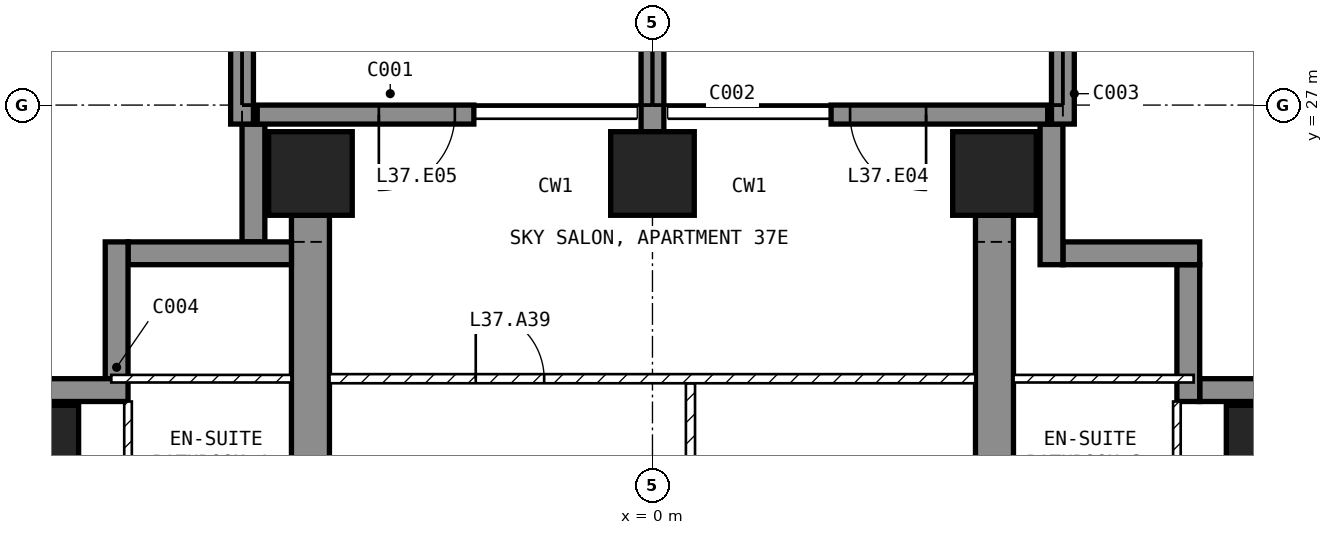
"""IFC4 building model, lengths in metres.
Left out: names, types, materials, properties, quantities, classifications, styles, units other than length and angle.
Written with IfcOpenShell. Run it as: python <this file> out.ifc"""

import sys

from ifc_helpers import new_model, si_unit, direction, frame, frame_2d, origin, origin_2d, place, context, subcontext, project, spatial, polyline, rectangle, outline, extrude, element, fill, save


model = new_model("IFC4")
c1 = context("Model", 3, precision=1e-05, world=origin(), true_north=direction((0.0, 1.0)))
c2 = subcontext(c1, "Body", "Model", "MODEL_VIEW")
j1 = project(units=[si_unit("LENGTHUNIT", "METRE"), si_unit("PLANEANGLEUNIT", "RADIAN")], contexts=[c1])
p1 = place(None, origin())
s1 = spatial("IfcSite", under=j1, at=p1, CompositionType="ELEMENT")
p2 = place(p1, origin())
s2 = spatial("IfcBuilding", under=s1, at=p2, CompositionType="ELEMENT")
p3 = place(p2, frame((0.0, 0.0, 151.4)))
s3 = spatial("IfcBuildingStorey", under=s2, at=p3, CompositionType="ELEMENT", Elevation=151.4)
for number, where, z_axis, x_axis in (
    (1, (-8.1, 22.5, -0.25), (0.0, 0.0, 1.0), (1.0, 0.0, 0.0)),
    (2, (-4.5, 26.1, -0.25), (0.0, 0.0, 1.0), (1.0, 0.0, 0.0)),
    (3, (0.0, 26.1, -0.25), (0.0, 0.0, 1.0), (1.0, 0.0, 0.0)),
    (4, (4.5, 26.1, -0.25), (0.0, 0.0, 1.0), (1.0, 0.0, 0.0)),
    (5, (8.1, 22.5, -0.25), (0.0, 0.0, 1.0), (1.0, 0.0, 0.0)),
):
    element("IfcColumn", number, at=place(p3, frame(where, z_axis=z_axis, x_axis=x_axis)), inside=s3, PredefinedType="COLUMN", context=c2, shape_type="SweptSolid", body=[
        extrude(rectangle(XDim=1.1, YDim=1.1, at=origin_2d()), origin(), (0.0, 0.0, 1.0), 3.45),
    ])
for number, where, z_axis, x_axis in (
    (6, (-4.75, 9.0, -0.25), (1.0, 0.0, 0.0), (0.0, 1.0, 0.0)),
    (7, (4.25, 9.0, -0.25), (1.0, 0.0, 0.0), (0.0, 1.0, 0.0)),
):
    element("IfcWall", number, at=place(p3, frame(where, z_axis=z_axis, x_axis=x_axis)), inside=s3, PredefinedType="SHEAR", context=c2, shape_type="SweptSolid", body=[
        extrude(outline(polyline([(0.0, 0.0), (2.1, 0.0), (2.1, 2.65), (4.5, 2.65), (4.5, 0.0), (9.9, 0.0), (9.9, 2.65), (12.3, 2.65), (12.3, 0.0), (16.55, 0.0), (16.55, 3.45), (0.0, 3.45), (0.0, 0.0)])), origin(), (0.0, 0.0, 1.0), 0.5),
    ])
p4 = place(p3, frame((5.2, 26.875, 0.0), z_axis=(0.0, 0.0, 1.0), x_axis=(-1.0, 0.0, 0.0)))
e8 = element("IfcWall", 8, at=p4, inside=s3, PredefinedType="SOLIDWALL", context=c2, shape_type="SweptSolid", body=[
    extrude(rectangle(XDim=2.85, YDim=0.25, at=frame_2d((1.425, 0.0))), origin(), (0.0, 0.0, 1.0), 3.2),
])
p5 = place(p4, frame((1.6, 0.0, 0.0)))
e9 = element("IfcOpeningElement", 9, at=p5, cuts=e8, PredefinedType="OPENING", context=c2, shape_type="SweptSolid", body=[
    extrude(rectangle(XDim=1.0, YDim=2.4, at=frame_2d((0.5, 1.2))), frame((0.0, 0.135, 0.0), z_axis=(0.0, -1.0, 0.0), x_axis=(1.0, 0.0, 0.0)), (0.0, 0.0, 1.0), 0.27),
])
p6 = place(p3, frame((-2.35, 26.875, 0.0), z_axis=(0.0, 0.0, 1.0), x_axis=(-1.0, 0.0, 0.0)))
e10 = element("IfcWall", 10, at=p6, inside=s3, PredefinedType="SOLIDWALL", context=c2, shape_type="SweptSolid", body=[
    extrude(rectangle(XDim=2.85, YDim=0.25, at=frame_2d((1.425, 0.0))), origin(), (0.0, 0.0, 1.0), 3.2),
])
p7 = place(p6, frame((0.25, 0.0, 0.0)))
e11 = element("IfcOpeningElement", 11, at=p7, cuts=e10, PredefinedType="OPENING", context=c2, shape_type="SweptSolid", body=[
    extrude(rectangle(XDim=1.0, YDim=2.4, at=frame_2d((0.5, 1.2))), frame((0.0, 0.135, 0.0), z_axis=(0.0, -1.0, 0.0), x_axis=(1.0, 0.0, 0.0)), (0.0, 0.0, 1.0), 0.27),
])
p8 = place(p3, frame((8.75, 23.25, 0.0), z_axis=(0.0, 0.0, 1.0), x_axis=(-1.0, 0.0, 0.0)))
e12 = element("IfcWall", 12, at=p8, inside=s3, PredefinedType="SOLIDWALL", context=c2, shape_type="SweptSolid", body=[
    extrude(rectangle(XDim=1.55, YDim=0.3, at=frame_2d((0.775, 0.0))), origin(), (0.0, 0.0, 1.0), 3.2),
])
p9 = place(p3, frame((7.05, 23.1, 0.0), z_axis=(0.0, 0.0, 1.0), x_axis=(0.0, 1.0, 0.0)))
e13 = element("IfcWall", 13, at=p9, inside=s3, PredefinedType="SOLIDWALL", context=c2, shape_type="SweptSolid", body=[
    extrude(rectangle(XDim=1.8, YDim=0.3, at=frame_2d((0.9, 0.0))), origin(), (0.0, 0.0, 1.0), 3.2),
])
p10 = place(p3, frame((7.2, 25.05, 0.0), z_axis=(0.0, 0.0, 1.0), x_axis=(-1.0, 0.0, 0.0)))
e14 = element("IfcWall", 14, at=p10, inside=s3, PredefinedType="SOLIDWALL", context=c2, shape_type="SweptSolid", body=[
    extrude(rectangle(XDim=1.8, YDim=0.3, at=frame_2d((0.9, 0.0))), origin(), (0.0, 0.0, 1.0), 3.2),
])
p11 = place(p3, frame((5.25, 24.9, 0.0), z_axis=(0.0, 0.0, 1.0), x_axis=(0.0, 1.0, 0.0)))
e15 = element("IfcWall", 15, at=p11, inside=s3, PredefinedType="SOLIDWALL", context=c2, shape_type="SweptSolid", body=[
    extrude(rectangle(XDim=1.85, YDim=0.3, at=frame_2d((0.925, 0.0))), origin(), (0.0, 0.0, 1.0), 3.2),
])
p12 = place(p3, frame((-5.25, 26.75, 0.0), z_axis=(0.0, 0.0, 1.0), x_axis=(0.0, -1.0, 0.0)))
e16 = element("IfcWall", 16, at=p12, inside=s3, PredefinedType="SOLIDWALL", context=c2, shape_type="SweptSolid", body=[
    extrude(rectangle(XDim=1.55, YDim=0.3, at=frame_2d((0.775, 0.0))), origin(), (0.0, 0.0, 1.0), 3.2),
])
p13 = place(p3, frame((-4.75, 25.05, 0.0), z_axis=(0.0, 0.0, 1.0), x_axis=(-1.0, 0.0, 0.0)))
e17 = element("IfcWall", 17, at=p13, inside=s3, PredefinedType="SOLIDWALL", context=c2, shape_type="SweptSolid", body=[
    extrude(rectangle(XDim=2.15, YDim=0.3, at=frame_2d((1.075, 0.0))), origin(), (0.0, 0.0, 1.0), 3.2),
])
p14 = place(p3, frame((-7.05, 25.2, 0.0), z_axis=(0.0, 0.0, 1.0), x_axis=(0.0, -1.0, 0.0)))
e18 = element("IfcWall", 18, at=p14, inside=s3, PredefinedType="SOLIDWALL", context=c2, shape_type="SweptSolid", body=[
    extrude(rectangle(XDim=1.8, YDim=0.3, at=frame_2d((0.9, 0.0))), origin(), (0.0, 0.0, 1.0), 3.2),
])
p15 = place(p3, frame((-6.9, 23.25, 0.0), z_axis=(0.0, 0.0, 1.0), x_axis=(-1.0, 0.0, 0.0)))
e19 = element("IfcWall", 19, at=p15, inside=s3, PredefinedType="SOLIDWALL", context=c2, shape_type="SweptSolid", body=[
    extrude(rectangle(XDim=1.85, YDim=0.3, at=frame_2d((0.925, 0.0))), origin(), (0.0, 0.0, 1.0), 3.2),
])
p16 = place(p3, frame((-5.4, 26.75, 0.0), z_axis=(0.0, 0.0, 1.0), x_axis=(0.0, 1.0, 0.0)))
e20 = element("IfcWall", 20, at=p16, inside=s3, PredefinedType="SOLIDWALL", context=c2, shape_type="SweptSolid", body=[
    extrude(rectangle(XDim=2.95, YDim=0.3, at=frame_2d((1.475, 0.0))), origin(), (0.0, 0.0, 1.0), 3.2),
])
p17 = place(p3, frame((0.0, 26.65, 0.0), z_axis=(0.0, 0.0, 1.0), x_axis=(0.0, 1.0, 0.0)))
e21 = element("IfcWall", 21, at=p17, inside=s3, PredefinedType="SOLIDWALL", context=c2, shape_type="SweptSolid", body=[
    extrude(rectangle(XDim=3.05, YDim=0.3, at=frame_2d((1.525, 0.0))), origin(), (0.0, 0.0, 1.0), 3.2),
])
p18 = place(p3, frame((5.4, 26.75, 0.0), z_axis=(0.0, 0.0, 1.0), x_axis=(0.0, 1.0, 0.0)))
e22 = element("IfcWall", 22, at=p18, inside=s3, PredefinedType="SOLIDWALL", context=c2, shape_type="SweptSolid", body=[
    extrude(rectangle(XDim=2.95, YDim=0.3, at=frame_2d((1.475, 0.0))), origin(), (0.0, 0.0, 1.0), 3.2),
])
p19 = place(p3, frame((0.5, 23.34, 0.0), z_axis=(0.0, 0.0, 1.0), x_axis=(0.0, -1.0, 0.0)))
e23 = element("IfcWall", 23, at=p19, inside=s3, PredefinedType="PARTITIONING", context=c2, shape_type="SweptSolid", body=[
    extrude(rectangle(XDim=4.38, YDim=0.12, at=frame_2d((2.19, 0.0))), origin(), (0.0, 0.0, 1.0), 3.2),
])
p20 = place(p19, frame((1.74, 0.0, 0.0)))
e24 = element("IfcOpeningElement", 24, at=p20, cuts=e23, PredefinedType="OPENING", context=c2, shape_type="SweptSolid", body=[
    extrude(rectangle(XDim=0.9, YDim=2.1, at=frame_2d((0.45, 1.05))), frame((0.0, 0.07, 0.0), z_axis=(0.0, -1.0, 0.0), x_axis=(1.0, 0.0, 0.0)), (0.0, 0.0, 1.0), 0.14),
])
p21 = place(p3, frame((-4.25, 23.4, 0.0), z_axis=(0.0, 0.0, 1.0), x_axis=(1.0, 0.0, 0.0)))
e25 = element("IfcWall", 25, at=p21, inside=s3, PredefinedType="PARTITIONING", context=c2, shape_type="SweptSolid", body=[
    extrude(rectangle(XDim=8.5, YDim=0.12, at=frame_2d((4.25, 0.0))), origin(), (0.0, 0.0, 1.0), 3.2),
])
p22 = place(p21, frame((1.925, 0.0, 0.0)))
e26 = element("IfcOpeningElement", 26, at=p22, cuts=e25, PredefinedType="OPENING", context=c2, shape_type="SweptSolid", body=[
    extrude(rectangle(XDim=0.9, YDim=2.1, at=frame_2d((0.45, 1.05))), frame((0.0, 0.07, 0.0), z_axis=(0.0, -1.0, 0.0), x_axis=(1.0, 0.0, 0.0)), (0.0, 0.0, 1.0), 0.14),
])
p23 = place(p3, frame((6.9, 20.45, 0.0), z_axis=(0.0, 0.0, 1.0), x_axis=(0.0, 1.0, 0.0)))
e27 = element("IfcWall", 27, at=p23, inside=s3, PredefinedType="PARTITIONING", context=c2, shape_type="SweptSolid", body=[
    extrude(rectangle(XDim=2.65, YDim=0.1, at=frame_2d((1.325, 0.0))), origin(), (0.0, 0.0, 1.0), 3.2),
])
p24 = place(p3, frame((4.75, 23.4, 0.0), z_axis=(0.0, 0.0, 1.0), x_axis=(1.0, 0.0, 0.0)))
e28 = element("IfcWall", 28, at=p24, inside=s3, PredefinedType="PARTITIONING", context=c2, shape_type="SweptSolid", body=[
    extrude(rectangle(XDim=2.37, YDim=0.1, at=frame_2d((1.185, 0.0))), origin(), (0.0, 0.0, 1.0), 3.2),
])
p25 = place(p3, frame((-6.9, 23.1, 0.0), z_axis=(0.0, 0.0, 1.0), x_axis=(0.0, -1.0, 0.0)))
e29 = element("IfcWall", 29, at=p25, inside=s3, PredefinedType="PARTITIONING", context=c2, shape_type="SweptSolid", body=[
    extrude(rectangle(XDim=2.65, YDim=0.1, at=frame_2d((1.325, 0.0))), origin(), (0.0, 0.0, 1.0), 3.2),
])
p26 = place(p3, frame((-7.12, 23.4, 0.0), z_axis=(0.0, 0.0, 1.0), x_axis=(1.0, 0.0, 0.0)))
e30 = element("IfcWall", 30, at=p26, inside=s3, PredefinedType="PARTITIONING", context=c2, shape_type="SweptSolid", body=[
    extrude(rectangle(XDim=2.37, YDim=0.1, at=frame_2d((1.185, 0.0))), origin(), (0.0, 0.0, 1.0), 3.2),
])
p27 = place(p5, origin())
e31 = element("IfcDoor", 31, at=p27, inside=s3, OperationType="SINGLE_SWING_LEFT", PredefinedType="DOOR", context=c2, shape_type="SweptSolid", body=[
    extrude(rectangle(XDim=1.0, YDim=2.4, at=frame_2d((0.5, 1.2))), frame((0.0, 0.025, 0.0), z_axis=(0.0, -1.0, 0.0), x_axis=(1.0, 0.0, 0.0)), (0.0, 0.0, 1.0), 0.05),
])
fill(e9, e31)
p28 = place(p7, origin())
e32 = element("IfcDoor", 32, at=p28, inside=s3, OperationType="SINGLE_SWING_RIGHT", PredefinedType="DOOR", context=c2, shape_type="SweptSolid", body=[
    extrude(rectangle(XDim=1.0, YDim=2.4, at=frame_2d((0.5, 1.2))), frame((0.0, 0.025, 0.0), z_axis=(0.0, -1.0, 0.0), x_axis=(1.0, 0.0, 0.0)), (0.0, 0.0, 1.0), 0.05),
])
fill(e11, e32)
p29 = place(p22, origin())
e33 = element("IfcDoor", 33, at=p29, inside=s3, OperationType="SINGLE_SWING_LEFT", PredefinedType="DOOR", context=c2, shape_type="SweptSolid", body=[
    extrude(rectangle(XDim=0.9, YDim=2.1, at=frame_2d((0.45, 1.05))), frame((0.0, 0.025, 0.0), z_axis=(0.0, -1.0, 0.0), x_axis=(1.0, 0.0, 0.0)), (0.0, 0.0, 1.0), 0.05),
])
fill(e26, e33)
save(model, sys.argv[1])
